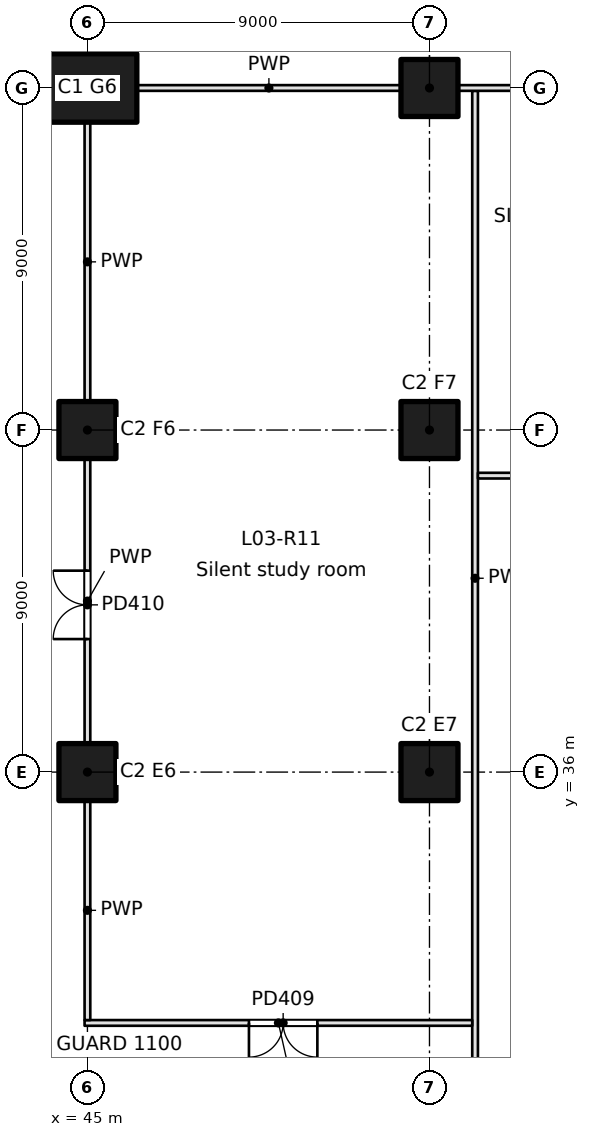
"""IFC4 building model, lengths in metres.
Left out: names, types, materials, properties, quantities, classifications, styles, units other than length and angle.
Written with IfcOpenShell. Run it as: python <this file> out.ifc"""

import sys

from ifc_helpers import new_model, si_unit, direction, frame, frame_2d, origin, origin_2d, place, context, subcontext, project, spatial, rectangle, extrude, element, fill, save


model = new_model("IFC4")
c1 = context("Model", 3, precision=1e-05, world=origin(), true_north=direction((0.0, 1.0)))
c2 = subcontext(c1, "Body", "Model", "MODEL_VIEW")
j1 = project(units=[si_unit("LENGTHUNIT", "METRE"), si_unit("PLANEANGLEUNIT", "RADIAN")], contexts=[c1])
p1 = place(None, origin())
s1 = spatial("IfcSite", under=j1, at=p1, CompositionType="ELEMENT")
p2 = place(p1, origin())
s2 = spatial("IfcBuilding", under=s1, at=p2, CompositionType="ELEMENT")
p3 = place(p2, frame((0.0, 0.0, 16.8)))
s3 = spatial("IfcBuildingStorey", under=s2, at=p3, CompositionType="ELEMENT", Elevation=16.8)
for number, where, z_axis, x_axis in (
    (1, (45.0, 36.0, 0.0), (0.0, 0.0, 1.0), (1.0, 0.0, 0.0)),
    (2, (45.0, 45.0, 0.0), (0.0, 0.0, 1.0), (1.0, 0.0, 0.0)),
):
    element("IfcColumn", number, at=place(p3, frame(where, z_axis=z_axis, x_axis=x_axis)), inside=s3, PredefinedType="COLUMN", context=c2, shape_type="SweptSolid", body=[
        extrude(rectangle(XDim=1.5, YDim=1.5, at=origin_2d()), origin(), (0.0, 0.0, 1.0), 4.8),
    ])
p4 = place(p3, frame((45.0, 54.0, 0.0), z_axis=(0.0, 0.0, 1.0), x_axis=(1.0, 0.0, 0.0)))
e3 = element("IfcColumn", 3, at=p4, inside=s3, PredefinedType="COLUMN", context=c2, shape_type="SweptSolid", body=[
    extrude(rectangle(XDim=2.6, YDim=1.8, at=origin_2d()), origin(), (0.0, 0.0, 1.0), 4.8),
])
p5 = place(p3, frame((54.0, 54.0, 0.0), z_axis=(0.0, 0.0, 1.0), x_axis=(1.0, 0.0, 0.0)))
e4 = element("IfcColumn", 4, at=p5, inside=s3, PredefinedType="COLUMN", context=c2, shape_type="SweptSolid", body=[
    extrude(rectangle(XDim=1.5, YDim=1.5, at=origin_2d()), origin(), (0.0, 0.0, 1.0), 4.8),
])
for number, where, z_axis, x_axis in (
    (5, (54.0, 36.0, -0.35), (0.0, 0.0, 1.0), (1.0, 0.0, 0.0)),
    (6, (54.0, 45.0, -0.35), (0.0, 0.0, 1.0), (1.0, 0.0, 0.0)),
):
    element("IfcColumn", number, at=place(p3, frame(where, z_axis=z_axis, x_axis=x_axis)), inside=s3, PredefinedType="COLUMN", context=c2, shape_type="SweptSolid", body=[
        extrude(rectangle(XDim=1.5, YDim=1.5, at=origin_2d()), origin(), (0.0, 0.0, 1.0), 5.15),
    ])
p6 = place(p3, frame((55.2, 28.275, 0.0), z_axis=(0.0, 0.0, 1.0), x_axis=(0.0, 1.0, 0.0)))
e7 = element("IfcWall", 7, at=p6, inside=s3, PredefinedType="PARTITIONING", context=c2, shape_type="SweptSolid", body=[
    extrude(rectangle(XDim=25.65, YDim=0.15, at=frame_2d((12.825, 0.0))), origin(), (0.0, 0.0, 1.0), 4.45),
])
p7 = place(p3, frame((55.275, 43.8, 0.0), z_axis=(0.0, 0.0, 1.0), x_axis=(1.0, 0.0, 0.0)))
e8 = element("IfcWall", 8, at=p7, inside=s3, PredefinedType="PARTITIONING", context=c2, shape_type="SweptSolid", body=[
    extrude(rectangle(XDim=24.45, YDim=0.15, at=frame_2d((12.225, 0.0))), origin(), (0.0, 0.0, 1.0), 4.45),
])
p8 = place(p3, frame((55.125, 29.4, 0.0), z_axis=(0.0, 0.0, 1.0), x_axis=(-1.0, 0.0, 0.0)))
e9 = element("IfcWall", 9, at=p8, inside=s3, PredefinedType="PARTITIONING", context=c2, shape_type="SweptSolid", body=[
    extrude(rectangle(XDim=10.2, YDim=0.15, at=frame_2d((5.1, 0.0))), origin(), (0.0, 0.0, 1.0), 4.45),
])
p9 = place(p8, frame((4.075, 0.0, 0.0)))
e10 = element("IfcOpeningElement", 10, at=p9, cuts=e9, PredefinedType="OPENING", context=c2, shape_type="SweptSolid", body=[
    extrude(rectangle(XDim=1.8, YDim=2.1, at=frame_2d((0.9, 1.05))), frame((0.0, 0.075, 0.0), z_axis=(0.0, -1.0, 0.0), x_axis=(1.0, 0.0, 0.0)), (0.0, 0.0, 1.0), 0.15),
])
p10 = place(p3, frame((45.0, 29.475, 0.0), z_axis=(0.0, 0.0, 1.0), x_axis=(0.0, 1.0, 0.0)))
e11 = element("IfcWall", 11, at=p10, inside=s3, PredefinedType="PARTITIONING", context=c2, shape_type="SweptSolid", body=[
    extrude(rectangle(XDim=5.775, YDim=0.15, at=frame_2d((2.887, 0.0))), origin(), (0.0, 0.0, 1.0), 4.45),
])
p11 = place(p3, frame((45.0, 36.75, 0.0), z_axis=(0.0, 0.0, 1.0), x_axis=(0.0, 1.0, 0.0)))
e12 = element("IfcWall", 12, at=p11, inside=s3, PredefinedType="PARTITIONING", context=c2, shape_type="SweptSolid", body=[
    extrude(rectangle(XDim=7.5, YDim=0.15, at=frame_2d((3.75, 0.0))), origin(), (0.0, 0.0, 1.0), 4.45),
])
p12 = place(p11, frame((2.75, 0.0, 0.0)))
e13 = element("IfcOpeningElement", 13, at=p12, cuts=e12, PredefinedType="OPENING", context=c2, shape_type="SweptSolid", body=[
    extrude(rectangle(XDim=1.8, YDim=2.1, at=frame_2d((0.9, 1.05))), frame((0.0, 0.075, 0.0), z_axis=(0.0, -1.0, 0.0), x_axis=(1.0, 0.0, 0.0)), (0.0, 0.0, 1.0), 0.15),
])
p13 = place(p3, frame((45.0, 45.75, 0.0), z_axis=(0.0, 0.0, 1.0), x_axis=(0.0, 1.0, 0.0)))
e14 = element("IfcWall", 14, at=p13, inside=s3, PredefinedType="PARTITIONING", context=c2, shape_type="SweptSolid", body=[
    extrude(rectangle(XDim=7.35, YDim=0.15, at=frame_2d((3.675, 0.0))), origin(), (0.0, 0.0, 1.0), 4.45),
])
p14 = place(p3, frame((46.3, 54.0, 0.0), z_axis=(0.0, 0.0, 1.0), x_axis=(1.0, 0.0, 0.0)))
e15 = element("IfcWall", 15, at=p14, inside=s3, PredefinedType="PARTITIONING", context=c2, shape_type="SweptSolid", body=[
    extrude(rectangle(XDim=6.95, YDim=0.15, at=frame_2d((3.475, 0.0))), origin(), (0.0, 0.0, 1.0), 4.45),
])
p15 = place(p3, frame((54.75, 54.0, 0.0), z_axis=(0.0, 0.0, 1.0), x_axis=(1.0, 0.0, 0.0)))
e16 = element("IfcWall", 16, at=p15, inside=s3, PredefinedType="PARTITIONING", context=c2, shape_type="SweptSolid", body=[
    extrude(rectangle(XDim=7.5, YDim=0.15, at=frame_2d((3.75, 0.0))), origin(), (0.0, 0.0, 1.0), 4.45),
])
p16 = place(p15, frame((3.45, 0.0, 0.0)))
e17 = element("IfcOpeningElement", 17, at=p16, cuts=e16, PredefinedType="OPENING", context=c2, shape_type="SweptSolid", body=[
    extrude(rectangle(XDim=1.0, YDim=2.1, at=frame_2d((0.5, 1.05))), frame((0.0, 0.075, 0.0), z_axis=(0.0, -1.0, 0.0), x_axis=(1.0, 0.0, 0.0)), (0.0, 0.0, 1.0), 0.15),
])
p17 = place(p9, origin())
e18 = element("IfcDoor", 18, at=p17, inside=s3, OperationType="DOUBLE_DOOR_SINGLE_SWING", PredefinedType="DOOR", context=c2, shape_type="SweptSolid", body=[
    extrude(rectangle(XDim=1.8, YDim=2.1, at=frame_2d((0.9, 1.05))), frame((0.0, 0.025, 0.0), z_axis=(0.0, -1.0, 0.0), x_axis=(1.0, 0.0, 0.0)), (0.0, 0.0, 1.0), 0.05),
])
fill(e10, e18)
p18 = place(p12, origin())
e19 = element("IfcDoor", 19, at=p18, inside=s3, OperationType="DOUBLE_DOOR_SINGLE_SWING", PredefinedType="DOOR", context=c2, shape_type="SweptSolid", body=[
    extrude(rectangle(XDim=1.8, YDim=2.1, at=frame_2d((0.9, 1.05))), frame((0.0, 0.025, 0.0), z_axis=(0.0, -1.0, 0.0), x_axis=(1.0, 0.0, 0.0)), (0.0, 0.0, 1.0), 0.05),
])
fill(e13, e19)
save(model, sys.argv[1])
